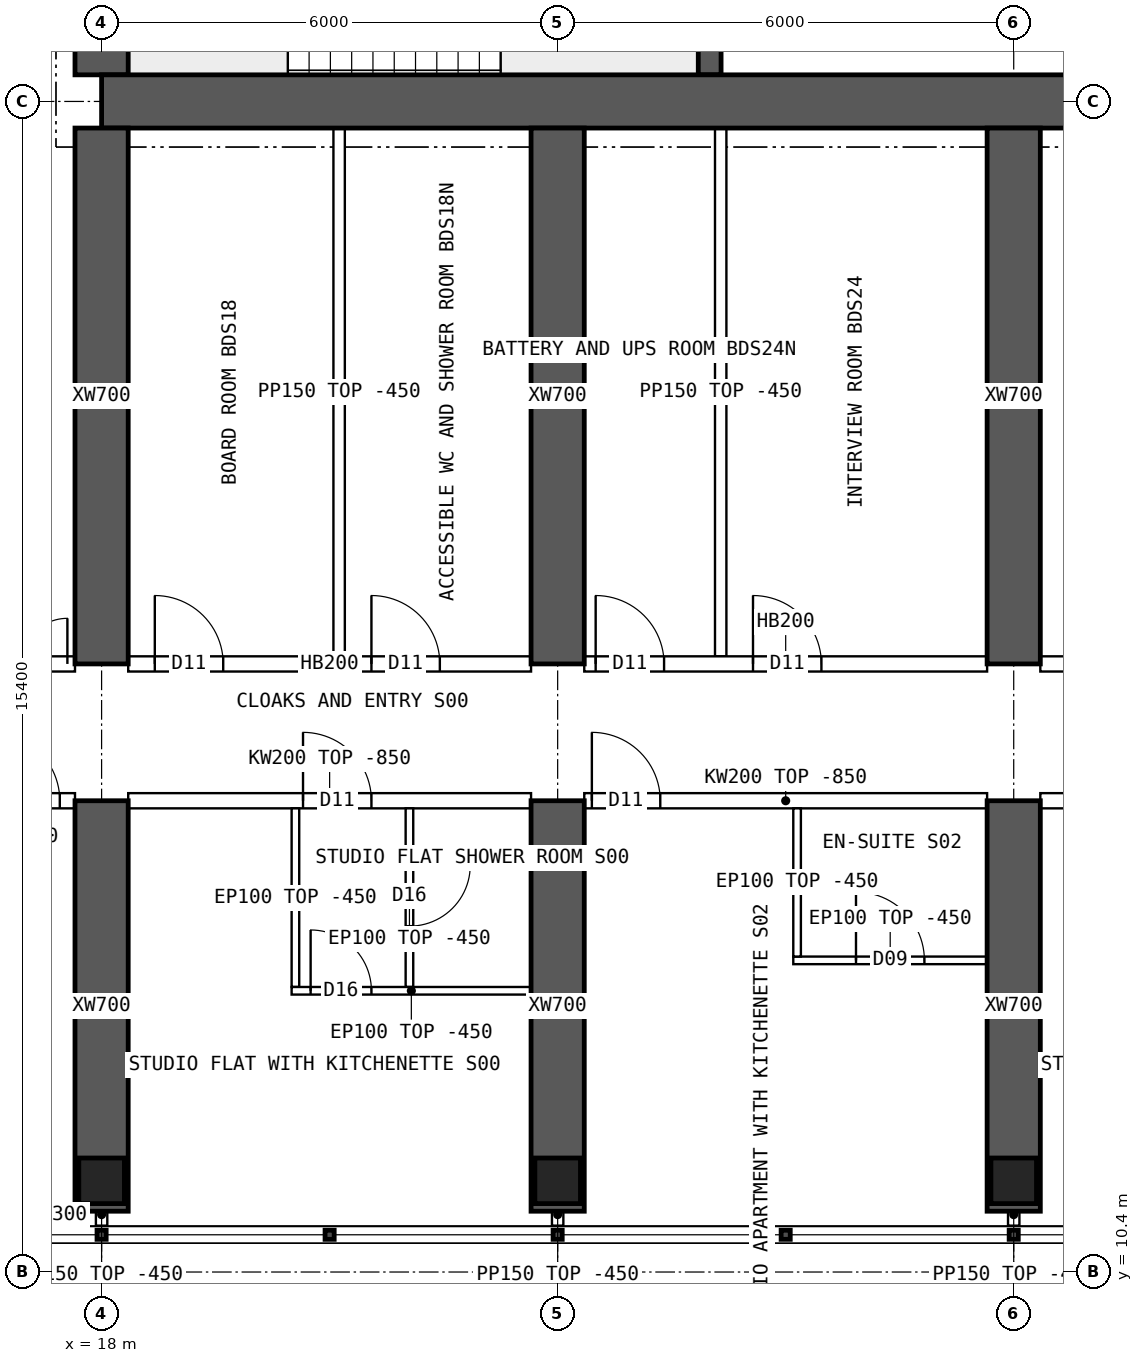
"""IFC4 building model, lengths in metres.
Left out: names, types, materials, properties, quantities, classifications, styles, units other than length and angle.
Written with IfcOpenShell. Run it as: python <this file> out.ifc"""

import sys

from ifc_helpers import new_model, si_unit, direction, frame, frame_2d, origin, origin_2d, place, context, subcontext, project, spatial, polyline, rectangle, hollow_rectangle, outline, extrude, element, fill, save


model = new_model("IFC4")
c1 = context("Model", 3, precision=1e-05, world=origin(), true_north=direction((0.0, 1.0)))
c2 = subcontext(c1, "Body", "Model", "MODEL_VIEW")
j1 = project(units=[si_unit("LENGTHUNIT", "METRE"), si_unit("PLANEANGLEUNIT", "RADIAN")], contexts=[c1])
p1 = place(None, origin())
s1 = spatial("IfcSite", under=j1, at=p1, CompositionType="ELEMENT")
p2 = place(p1, origin())
s2 = spatial("IfcBuilding", under=s1, at=p2, CompositionType="ELEMENT")
p3 = place(p2, frame((0.0, 0.0, 227.8)))
s3 = spatial("IfcBuildingStorey", under=s2, at=p3, CompositionType="ELEMENT", Elevation=227.8)
for number, where, z_axis, x_axis in (
    (1, (18.0, 11.6, 0.0), (0.0, 0.0, 1.0), (1.0, 0.0, 0.0)),
    (2, (24.0, 11.6, 0.0), (0.0, 0.0, 1.0), (1.0, 0.0, 0.0)),
    (3, (30.0, 11.6, 0.0), (0.0, 0.0, 1.0), (1.0, 0.0, 0.0)),
):
    element("IfcColumn", number, at=place(p3, frame(where, z_axis=z_axis, x_axis=x_axis)), inside=s3, PredefinedType="COLUMN", context=c2, shape_type="SweptSolid", body=[
        extrude(hollow_rectangle(XDim=0.6, YDim=0.6, WallThickness=0.06, at=origin_2d()), origin(), (0.0, 0.0, 1.0), 3.75),
    ])
p4 = place(p3, frame((18.0, 25.8, 0.0), z_axis=(0.0, 0.0, 1.0), x_axis=(1.0, 0.0, 0.0)))
e4 = element("IfcWall", 4, at=p4, inside=s3, PredefinedType="SHEAR", context=c2, shape_type="SweptSolid", body=[
    extrude(rectangle(XDim=48.0, YDim=0.7, at=frame_2d((24.0, 0.0))), origin(), (0.0, 0.0, 1.0), 3.75),
])
p5 = place(p3, frame((18.0, 26.15, 0.0), z_axis=(0.0, 0.0, 1.0), x_axis=(0.0, 1.0, 0.0)))
e5 = element("IfcWall", 5, at=p5, inside=s3, PredefinedType="SHEAR", context=c2, shape_type="SweptSolid", body=[
    extrude(rectangle(XDim=11.7, YDim=0.7, at=frame_2d((5.85, 0.0))), origin(), (0.0, 0.0, 1.0), 3.75),
])
p6 = place(p5, frame((5.15, 0.0, 0.0)))
e6 = element("IfcOpeningElement", 6, at=p6, cuts=e5, PredefinedType="OPENING", context=c2, shape_type="SweptSolid", body=[
    extrude(rectangle(XDim=1.2, YDim=2.1, at=frame_2d((0.6, 1.05))), frame((0.0, 0.36, 0.0), z_axis=(0.0, -1.0, 0.0), x_axis=(1.0, 0.0, 0.0)), (0.0, 0.0, 1.0), 0.72),
])
p7 = place(p3, frame((26.0, 26.15, 0.0), z_axis=(0.0, 0.0, 1.0), x_axis=(0.0, 1.0, 0.0)))
e7 = element("IfcWall", 7, at=p7, inside=s3, PredefinedType="SHEAR", context=c2, shape_type="SweptSolid", body=[
    extrude(rectangle(XDim=4.1, YDim=0.3, at=frame_2d((2.05, 0.0))), origin(), (0.0, 0.0, 1.0), 3.75),
])
p8 = place(p3, frame((18.0, 11.2, 0.0), z_axis=(0.0, 0.0, 1.0), x_axis=(0.0, 1.0, 0.0)))
e8 = element("IfcWall", 8, at=p8, inside=s3, PredefinedType="SHEAR", context=c2, shape_type="SweptSolid", body=[
    extrude(rectangle(XDim=5.4, YDim=0.7, at=frame_2d((2.7, 0.0))), origin(), (0.0, 0.0, 1.0), 3.75),
])
p9 = place(p3, frame((18.0, 18.4, 0.0), z_axis=(0.0, 0.0, 1.0), x_axis=(0.0, 1.0, 0.0)))
e9 = element("IfcWall", 9, at=p9, inside=s3, PredefinedType="SHEAR", context=c2, shape_type="SweptSolid", body=[
    extrude(rectangle(XDim=7.05, YDim=0.7, at=frame_2d((3.525, 0.0))), origin(), (0.0, 0.0, 1.0), 3.75),
])
p10 = place(p3, frame((24.0, 11.2, 0.0), z_axis=(0.0, 0.0, 1.0), x_axis=(0.0, 1.0, 0.0)))
e10 = element("IfcWall", 10, at=p10, inside=s3, PredefinedType="SHEAR", context=c2, shape_type="SweptSolid", body=[
    extrude(rectangle(XDim=5.4, YDim=0.7, at=frame_2d((2.7, 0.0))), origin(), (0.0, 0.0, 1.0), 3.75),
])
p11 = place(p3, frame((24.0, 18.4, 0.0), z_axis=(0.0, 0.0, 1.0), x_axis=(0.0, 1.0, 0.0)))
e11 = element("IfcWall", 11, at=p11, inside=s3, PredefinedType="SHEAR", context=c2, shape_type="SweptSolid", body=[
    extrude(rectangle(XDim=7.05, YDim=0.7, at=frame_2d((3.525, 0.0))), origin(), (0.0, 0.0, 1.0), 3.75),
])
p12 = place(p3, frame((30.0, 11.2, 0.0), z_axis=(0.0, 0.0, 1.0), x_axis=(0.0, 1.0, 0.0)))
e12 = element("IfcWall", 12, at=p12, inside=s3, PredefinedType="SHEAR", context=c2, shape_type="SweptSolid", body=[
    extrude(rectangle(XDim=5.4, YDim=0.7, at=frame_2d((2.7, 0.0))), origin(), (0.0, 0.0, 1.0), 3.75),
])
p13 = place(p3, frame((30.0, 18.4, 0.0), z_axis=(0.0, 0.0, 1.0), x_axis=(0.0, 1.0, 0.0)))
e13 = element("IfcWall", 13, at=p13, inside=s3, PredefinedType="SHEAR", context=c2, shape_type="SweptSolid", body=[
    extrude(rectangle(XDim=7.05, YDim=0.7, at=frame_2d((3.525, 0.0))), origin(), (0.0, 0.0, 1.0), 3.75),
])
p14 = place(p3, frame((17.2, 11.15, 0.0), z_axis=(0.0, 0.0, 1.0), x_axis=(1.0, 0.0, 0.0)))
e14 = element("IfcWall", 14, at=p14, inside=s3, PredefinedType="SOLIDWALL", context=c2, shape_type="SweptSolid", body=[
    extrude(rectangle(XDim=0.45, YDim=0.3, at=frame_2d((0.225, 0.0))), origin(), (0.0, 0.0, 1.0), 3.3),
])
p15 = place(p3, frame((15.6, 16.6, 0.0), z_axis=(0.0, 0.0, 1.0), x_axis=(1.0, 0.0, 0.0)))
e15 = element("IfcWall", 15, at=p15, inside=s3, PredefinedType="SOLIDWALL", context=c2, shape_type="SweptSolid", body=[
    extrude(rectangle(XDim=2.05, YDim=0.2, at=frame_2d((1.025, 0.0))), origin(), (0.0, 0.0, 1.0), 3.3),
])
p16 = place(p15, frame((0.95, 0.0, 0.0)))
e16 = element("IfcOpeningElement", 16, at=p16, cuts=e15, PredefinedType="OPENING", context=c2, shape_type="SweptSolid", body=[
    extrude(rectangle(XDim=0.9, YDim=2.1, at=frame_2d((0.45, 1.05))), frame((0.0, 0.11, 0.0), z_axis=(0.0, -1.0, 0.0), x_axis=(1.0, 0.0, 0.0)), (0.0, 0.0, 1.0), 0.22),
])
p17 = place(p3, frame((15.6, 18.4, 0.0), z_axis=(0.0, 0.0, 1.0), x_axis=(1.0, 0.0, 0.0)))
e17 = element("IfcWall", 17, at=p17, inside=s3, PredefinedType="SOLIDWALL", context=c2, shape_type="SweptSolid", body=[
    extrude(rectangle(XDim=2.05, YDim=0.2, at=frame_2d((1.025, 0.0))), origin(), (0.0, 0.0, 1.0), 3.3),
])
p18 = place(p17, frame((0.75, 0.0, 0.0)))
e18 = element("IfcOpeningElement", 18, at=p18, cuts=e17, PredefinedType="OPENING", context=c2, shape_type="SweptSolid", body=[
    extrude(rectangle(XDim=1.2, YDim=2.1, at=frame_2d((0.6, 1.05))), frame((0.0, 0.11, 0.0), z_axis=(0.0, -1.0, 0.0), x_axis=(1.0, 0.0, 0.0)), (0.0, 0.0, 1.0), 0.22),
])
p19 = place(p3, frame((18.35, 16.6, 0.0), z_axis=(0.0, 0.0, 1.0), x_axis=(1.0, 0.0, 0.0)))
e19 = element("IfcWall", 19, at=p19, inside=s3, PredefinedType="SOLIDWALL", context=c2, shape_type="SweptSolid", body=[
    extrude(outline(polyline([(0.0, 0.0), (5.3, 0.0), (5.3, 2.9), (0.0, 2.9), (0.0, 0.0)])), frame((0.0, 0.1, 0.0), z_axis=(0.0, -1.0, 0.0), x_axis=(1.0, 0.0, 0.0)), (0.0, 0.0, 1.0), 0.2),
])
p20 = place(p19, frame((2.3, 0.0, 0.0)))
e20 = element("IfcOpeningElement", 20, at=p20, cuts=e19, PredefinedType="OPENING", context=c2, shape_type="SweptSolid", body=[
    extrude(rectangle(XDim=0.9, YDim=2.1, at=frame_2d((0.45, 1.05))), frame((0.0, 0.11, 0.0), z_axis=(0.0, -1.0, 0.0), x_axis=(1.0, 0.0, 0.0)), (0.0, 0.0, 1.0), 0.22),
])
p21 = place(p3, frame((18.35, 18.4, 0.0), z_axis=(0.0, 0.0, 1.0), x_axis=(1.0, 0.0, 0.0)))
e21 = element("IfcWall", 21, at=p21, inside=s3, PredefinedType="SOLIDWALL", context=c2, shape_type="SweptSolid", body=[
    extrude(rectangle(XDim=5.3, YDim=0.2, at=frame_2d((2.65, 0.0))), origin(), (0.0, 0.0, 1.0), 3.3),
])
p22 = place(p21, frame((0.35, 0.0, 0.0)))
e22 = element("IfcOpeningElement", 22, at=p22, cuts=e21, PredefinedType="OPENING", context=c2, shape_type="SweptSolid", body=[
    extrude(rectangle(XDim=0.9, YDim=2.1, at=frame_2d((0.45, 1.05))), frame((0.0, 0.11, 0.0), z_axis=(0.0, -1.0, 0.0), x_axis=(1.0, 0.0, 0.0)), (0.0, 0.0, 1.0), 0.22),
])
p23 = place(p21, frame((3.2, 0.0, 0.0)))
e23 = element("IfcOpeningElement", 23, at=p23, cuts=e21, PredefinedType="OPENING", context=c2, shape_type="SweptSolid", body=[
    extrude(rectangle(XDim=0.9, YDim=2.1, at=frame_2d((0.45, 1.05))), frame((0.0, 0.11, 0.0), z_axis=(0.0, -1.0, 0.0), x_axis=(1.0, 0.0, 0.0)), (0.0, 0.0, 1.0), 0.22),
])
p24 = place(p3, frame((24.35, 16.6, 0.0), z_axis=(0.0, 0.0, 1.0), x_axis=(1.0, 0.0, 0.0)))
e24 = element("IfcWall", 24, at=p24, inside=s3, PredefinedType="SOLIDWALL", context=c2, shape_type="SweptSolid", body=[
    extrude(outline(polyline([(0.0, 0.0), (5.3, 0.0), (5.3, 2.9), (0.0, 2.9), (0.0, 0.0)])), frame((0.0, 0.1, 0.0), z_axis=(0.0, -1.0, 0.0), x_axis=(1.0, 0.0, 0.0)), (0.0, 0.0, 1.0), 0.2),
])
p25 = place(p24, frame((0.1, 0.0, 0.0)))
e25 = element("IfcOpeningElement", 25, at=p25, cuts=e24, PredefinedType="OPENING", context=c2, shape_type="SweptSolid", body=[
    extrude(rectangle(XDim=0.9, YDim=2.1, at=frame_2d((0.45, 1.05))), frame((0.0, 0.11, 0.0), z_axis=(0.0, -1.0, 0.0), x_axis=(1.0, 0.0, 0.0)), (0.0, 0.0, 1.0), 0.22),
])
p26 = place(p3, frame((24.35, 18.4, 0.0), z_axis=(0.0, 0.0, 1.0), x_axis=(1.0, 0.0, 0.0)))
e26 = element("IfcWall", 26, at=p26, inside=s3, PredefinedType="SOLIDWALL", context=c2, shape_type="SweptSolid", body=[
    extrude(rectangle(XDim=5.3, YDim=0.2, at=frame_2d((2.65, 0.0))), origin(), (0.0, 0.0, 1.0), 3.3),
])
p27 = place(p26, frame((0.15, 0.0, 0.0)))
e27 = element("IfcOpeningElement", 27, at=p27, cuts=e26, PredefinedType="OPENING", context=c2, shape_type="SweptSolid", body=[
    extrude(rectangle(XDim=0.9, YDim=2.1, at=frame_2d((0.45, 1.05))), frame((0.0, 0.11, 0.0), z_axis=(0.0, -1.0, 0.0), x_axis=(1.0, 0.0, 0.0)), (0.0, 0.0, 1.0), 0.22),
])
p28 = place(p26, frame((2.22, 0.0, 0.0)))
e28 = element("IfcOpeningElement", 28, at=p28, cuts=e26, PredefinedType="OPENING", context=c2, shape_type="SweptSolid", body=[
    extrude(rectangle(XDim=0.9, YDim=2.1, at=frame_2d((0.45, 1.05))), frame((0.0, 0.11, 0.0), z_axis=(0.0, -1.0, 0.0), x_axis=(1.0, 0.0, 0.0)), (0.0, 0.0, 1.0), 0.22),
])
p29 = place(p3, frame((30.35, 16.6, 0.0), z_axis=(0.0, 0.0, 1.0), x_axis=(1.0, 0.0, 0.0)))
e29 = element("IfcWall", 29, at=p29, inside=s3, PredefinedType="SOLIDWALL", context=c2, shape_type="SweptSolid", body=[
    extrude(outline(polyline([(0.0, 0.0), (5.3, 0.0), (5.3, 2.9), (0.0, 2.9), (0.0, 0.0)])), frame((0.0, 0.1, 0.0), z_axis=(0.0, -1.0, 0.0), x_axis=(1.0, 0.0, 0.0)), (0.0, 0.0, 1.0), 0.2),
])
p30 = place(p29, frame((2.3, 0.0, 0.0)))
e30 = element("IfcOpeningElement", 30, at=p30, cuts=e29, PredefinedType="OPENING", context=c2, shape_type="SweptSolid", body=[
    extrude(rectangle(XDim=0.9, YDim=2.1, at=frame_2d((0.45, 1.05))), frame((0.0, 0.11, 0.0), z_axis=(0.0, -1.0, 0.0), x_axis=(1.0, 0.0, 0.0)), (0.0, 0.0, 1.0), 0.22),
])
p31 = place(p3, frame((30.35, 18.4, 0.0), z_axis=(0.0, 0.0, 1.0), x_axis=(1.0, 0.0, 0.0)))
e31 = element("IfcWall", 31, at=p31, inside=s3, PredefinedType="SOLIDWALL", context=c2, shape_type="SweptSolid", body=[
    extrude(rectangle(XDim=5.3, YDim=0.2, at=frame_2d((2.65, 0.0))), origin(), (0.0, 0.0, 1.0), 3.3),
])
p32 = place(p31, frame((0.8, 0.0, 0.0)))
e32 = element("IfcOpeningElement", 32, at=p32, cuts=e31, PredefinedType="OPENING", context=c2, shape_type="SweptSolid", body=[
    extrude(rectangle(XDim=1.0, YDim=2.1, at=frame_2d((0.5, 1.05))), frame((0.0, 0.11, 0.0), z_axis=(0.0, -1.0, 0.0), x_axis=(1.0, 0.0, 0.0)), (0.0, 0.0, 1.0), 0.22),
])
p33 = place(p3, frame((23.65, 14.1, 0.0), z_axis=(0.0, 0.0, 1.0), x_axis=(-1.0, 0.0, 0.0)))
e33 = element("IfcWall", 33, at=p33, inside=s3, PredefinedType="PARTITIONING", context=c2, shape_type="SweptSolid", body=[
    extrude(rectangle(XDim=3.15, YDim=0.1, at=frame_2d((1.575, 0.0))), origin(), (0.0, 0.0, 1.0), 3.3),
])
p34 = place(p33, frame((2.1, 0.0, 0.0)))
e34 = element("IfcOpeningElement", 34, at=p34, cuts=e33, PredefinedType="OPENING", context=c2, shape_type="SweptSolid", body=[
    extrude(rectangle(XDim=0.8, YDim=2.1, at=frame_2d((0.4, 1.05))), frame((0.0, 0.06, 0.0), z_axis=(0.0, -1.0, 0.0), x_axis=(1.0, 0.0, 0.0)), (0.0, 0.0, 1.0), 0.12),
])
p35 = place(p3, frame((20.55, 14.15, 0.0), z_axis=(0.0, 0.0, 1.0), x_axis=(0.0, 1.0, 0.0)))
e35 = element("IfcWall", 35, at=p35, inside=s3, PredefinedType="PARTITIONING", context=c2, shape_type="SweptSolid", body=[
    extrude(outline(polyline([(0.0, 0.0), (2.35, 0.0), (2.35, 2.9), (2.302, 2.9), (2.3, 3.3), (0.0, 3.3), (0.0, 0.0)])), frame((0.0, 0.05, 0.0), z_axis=(0.0, -1.0, 0.0), x_axis=(1.0, 0.0, 0.0)), (0.0, 0.0, 1.0), 0.1),
])
p36 = place(p3, frame((22.05, 14.15, 0.0), z_axis=(0.0, 0.0, 1.0), x_axis=(0.0, 1.0, 0.0)))
e36 = element("IfcWall", 36, at=p36, inside=s3, PredefinedType="PARTITIONING", context=c2, shape_type="SweptSolid", body=[
    extrude(outline(polyline([(0.0, 0.0), (2.35, 0.0), (2.35, 2.9), (2.302, 2.9), (2.3, 3.3), (0.0, 3.3), (0.0, 0.0)])), frame((0.0, 0.05, 0.0), z_axis=(0.0, -1.0, 0.0), x_axis=(1.0, 0.0, 0.0)), (0.0, 0.0, 1.0), 0.1),
])
p37 = place(p36, frame((0.8, 0.0, 0.0)))
e37 = element("IfcOpeningElement", 37, at=p37, cuts=e36, PredefinedType="OPENING", context=c2, shape_type="SweptSolid", body=[
    extrude(rectangle(XDim=0.8, YDim=2.1, at=frame_2d((0.4, 1.05))), frame((0.0, 0.06, 0.0), z_axis=(0.0, -1.0, 0.0), x_axis=(1.0, 0.0, 0.0)), (0.0, 0.0, 1.0), 0.12),
])
p38 = place(p3, frame((29.65, 14.5, 0.0), z_axis=(0.0, 0.0, 1.0), x_axis=(-1.0, 0.0, 0.0)))
e38 = element("IfcWall", 38, at=p38, inside=s3, PredefinedType="PARTITIONING", context=c2, shape_type="SweptSolid", body=[
    extrude(rectangle(XDim=2.55, YDim=0.1, at=frame_2d((1.275, 0.0))), origin(), (0.0, 0.0, 1.0), 3.3),
])
p39 = place(p38, frame((0.825, 0.0, 0.0)))
e39 = element("IfcOpeningElement", 39, at=p39, cuts=e38, PredefinedType="OPENING", context=c2, shape_type="SweptSolid", body=[
    extrude(rectangle(XDim=0.9, YDim=2.1, at=frame_2d((0.45, 1.05))), frame((0.0, 0.06, 0.0), z_axis=(0.0, -1.0, 0.0), x_axis=(1.0, 0.0, 0.0)), (0.0, 0.0, 1.0), 0.12),
])
p40 = place(p3, frame((27.15, 14.55, 0.0), z_axis=(0.0, 0.0, 1.0), x_axis=(0.0, 1.0, 0.0)))
e40 = element("IfcWall", 40, at=p40, inside=s3, PredefinedType="PARTITIONING", context=c2, shape_type="SweptSolid", body=[
    extrude(outline(polyline([(0.0, 0.0), (1.95, 0.0), (1.95, 2.9), (1.902, 2.9), (1.9, 3.3), (0.0, 3.3), (0.0, 0.0)])), frame((0.0, 0.05, 0.0), z_axis=(0.0, -1.0, 0.0), x_axis=(1.0, 0.0, 0.0)), (0.0, 0.0, 1.0), 0.1),
])
for number, where, z_axis, x_axis in (
    (41, (21.125, 18.5, 0.0), (0.0, 0.0, 1.0), (0.0, 1.0, 0.0)),
    (42, (26.145, 18.5, 0.0), (0.0, 0.0, 1.0), (0.0, 1.0, 0.0)),
):
    element("IfcWall", number, at=place(p3, frame(where, z_axis=z_axis, x_axis=x_axis)), inside=s3, PredefinedType="PARTITIONING", context=c2, shape_type="SweptSolid", body=[
        extrude(rectangle(XDim=6.95, YDim=0.15, at=frame_2d((3.475, 0.0))), origin(), (0.0, 0.0, 1.0), 3.3),
    ])
for number, where, z_axis, x_axis in (
    (43, (18.0, 11.3, 0.0), (0.0, 0.0, 1.0), (0.0, -1.0, 0.0)),
    (44, (24.0, 11.3, 0.0), (0.0, 0.0, 1.0), (0.0, -1.0, 0.0)),
    (45, (30.0, 11.3, 0.0), (0.0, 0.0, 1.0), (0.0, -1.0, 0.0)),
):
    element("IfcWall", number, at=place(p3, frame(where, z_axis=z_axis, x_axis=x_axis)), inside=s3, PredefinedType="PARTITIONING", context=c2, shape_type="SweptSolid", body=[
        extrude(rectangle(XDim=0.29, YDim=0.15, at=frame_2d((0.145, 0.0))), origin(), (0.0, 0.0, 1.0), 3.3),
    ])
p41 = place(p18, origin())
e46 = element("IfcDoor", 46, at=p41, inside=s3, OperationType="DOUBLE_DOOR_SINGLE_SWING", PredefinedType="DOOR", context=c2, shape_type="SweptSolid", body=[
    extrude(rectangle(XDim=1.2, YDim=2.1, at=frame_2d((0.6, 1.05))), frame((0.0, 0.025, 0.0), z_axis=(0.0, -1.0, 0.0), x_axis=(1.0, 0.0, 0.0)), (0.0, 0.0, 1.0), 0.05),
])
fill(e18, e46)
p42 = place(p34, origin())
e47 = element("IfcDoor", 47, at=p42, inside=s3, OperationType="SINGLE_SWING_RIGHT", PredefinedType="DOOR", context=c2, shape_type="SweptSolid", body=[
    extrude(rectangle(XDim=0.8, YDim=2.1, at=frame_2d((0.4, 1.05))), frame((0.0, 0.025, 0.0), z_axis=(0.0, -1.0, 0.0), x_axis=(1.0, 0.0, 0.0)), (0.0, 0.0, 1.0), 0.05),
])
fill(e34, e47)
p43 = place(p37, origin())
e48 = element("IfcDoor", 48, at=p43, inside=s3, OperationType="SINGLE_SWING_RIGHT", PredefinedType="DOOR", context=c2, shape_type="SweptSolid", body=[
    extrude(rectangle(XDim=0.8, YDim=2.1, at=frame_2d((0.4, 1.05))), frame((0.0, 0.025, 0.0), z_axis=(0.0, -1.0, 0.0), x_axis=(1.0, 0.0, 0.0)), (0.0, 0.0, 1.0), 0.05),
])
fill(e37, e48)
p44 = place(p20, origin())
e49 = element("IfcDoor", 49, at=p44, inside=s3, OperationType="SINGLE_SWING_LEFT", PredefinedType="DOOR", context=c2, shape_type="SweptSolid", body=[
    extrude(rectangle(XDim=0.9, YDim=2.1, at=frame_2d((0.45, 1.05))), frame((0.0, 0.025, 0.0), z_axis=(0.0, -1.0, 0.0), x_axis=(1.0, 0.0, 0.0)), (0.0, 0.0, 1.0), 0.05),
])
fill(e20, e49)
p45 = place(p39, origin())
e50 = element("IfcDoor", 50, at=p45, inside=s3, OperationType="SINGLE_SWING_RIGHT", PredefinedType="DOOR", context=c2, shape_type="SweptSolid", body=[
    extrude(rectangle(XDim=0.9, YDim=2.1, at=frame_2d((0.45, 1.05))), frame((0.0, 0.025, 0.0), z_axis=(0.0, -1.0, 0.0), x_axis=(1.0, 0.0, 0.0)), (0.0, 0.0, 1.0), 0.05),
])
fill(e39, e50)
p46 = place(p25, origin())
e51 = element("IfcDoor", 51, at=p46, inside=s3, OperationType="SINGLE_SWING_LEFT", PredefinedType="DOOR", context=c2, shape_type="SweptSolid", body=[
    extrude(rectangle(XDim=0.9, YDim=2.1, at=frame_2d((0.45, 1.05))), frame((0.0, 0.025, 0.0), z_axis=(0.0, -1.0, 0.0), x_axis=(1.0, 0.0, 0.0)), (0.0, 0.0, 1.0), 0.05),
])
fill(e25, e51)
p47 = place(p22, origin())
e52 = element("IfcDoor", 52, at=p47, inside=s3, OperationType="SINGLE_SWING_LEFT", PredefinedType="DOOR", context=c2, shape_type="SweptSolid", body=[
    extrude(rectangle(XDim=0.9, YDim=2.1, at=frame_2d((0.45, 1.05))), frame((0.0, 0.025, 0.0), z_axis=(0.0, -1.0, 0.0), x_axis=(1.0, 0.0, 0.0)), (0.0, 0.0, 1.0), 0.05),
])
fill(e22, e52)
p48 = place(p23, origin())
e53 = element("IfcDoor", 53, at=p48, inside=s3, OperationType="SINGLE_SWING_LEFT", PredefinedType="DOOR", context=c2, shape_type="SweptSolid", body=[
    extrude(rectangle(XDim=0.9, YDim=2.1, at=frame_2d((0.45, 1.05))), frame((0.0, 0.025, 0.0), z_axis=(0.0, -1.0, 0.0), x_axis=(1.0, 0.0, 0.0)), (0.0, 0.0, 1.0), 0.05),
])
fill(e23, e53)
p49 = place(p27, origin())
e54 = element("IfcDoor", 54, at=p49, inside=s3, OperationType="SINGLE_SWING_LEFT", PredefinedType="DOOR", context=c2, shape_type="SweptSolid", body=[
    extrude(rectangle(XDim=0.9, YDim=2.1, at=frame_2d((0.45, 1.05))), frame((0.0, 0.025, 0.0), z_axis=(0.0, -1.0, 0.0), x_axis=(1.0, 0.0, 0.0)), (0.0, 0.0, 1.0), 0.05),
])
fill(e27, e54)
p50 = place(p28, origin())
e55 = element("IfcDoor", 55, at=p50, inside=s3, OperationType="SINGLE_SWING_LEFT", PredefinedType="DOOR", context=c2, shape_type="SweptSolid", body=[
    extrude(rectangle(XDim=0.9, YDim=2.1, at=frame_2d((0.45, 1.05))), frame((0.0, 0.025, 0.0), z_axis=(0.0, -1.0, 0.0), x_axis=(1.0, 0.0, 0.0)), (0.0, 0.0, 1.0), 0.05),
])
fill(e28, e55)
p51 = place(p16, origin())
e56 = element("IfcDoor", 56, at=p51, inside=s3, OperationType="SINGLE_SWING_LEFT", PredefinedType="DOOR", context=c2, shape_type="SweptSolid", body=[
    extrude(rectangle(XDim=0.9, YDim=2.1, at=frame_2d((0.45, 1.05))), frame((0.0, 0.025, 0.0), z_axis=(0.0, -1.0, 0.0), x_axis=(1.0, 0.0, 0.0)), (0.0, 0.0, 1.0), 0.05),
])
fill(e16, e56)
save(model, sys.argv[1])
